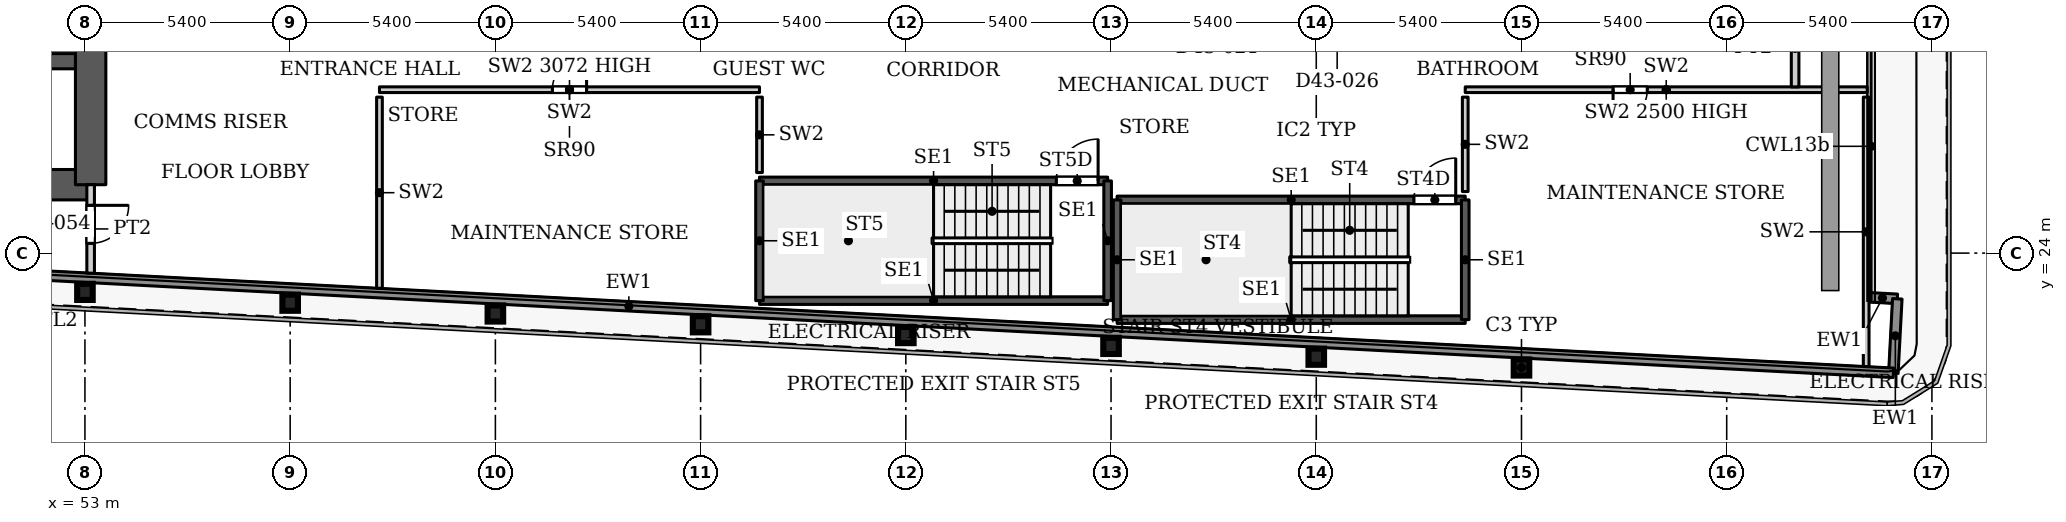
"""IFC4 building model, lengths in metres.
Left out: names, types, materials, properties, quantities, classifications, styles, units other than length and angle.
Written with IfcOpenShell. Run it as: python <this file> out.ifc"""

import sys

from ifc_helpers import new_model, si_unit, direction, frame, frame_2d, origin, origin_2d, place, context, subcontext, project, spatial, rectangle, i_section, extrude, source, transform, mapped, element, fill, save


model = new_model("IFC4")
c1 = context("Model", 3, precision=1e-05, world=origin(), true_north=direction((0.0, 1.0)))
c2 = subcontext(c1, "Body", "Model", "MODEL_VIEW")
j1 = project(units=[si_unit("LENGTHUNIT", "METRE"), si_unit("PLANEANGLEUNIT", "RADIAN")], contexts=[c1])
p1 = place(None, origin())
s1 = spatial("IfcSite", under=j1, at=p1, CompositionType="ELEMENT")
p2 = place(p1, origin())
s2 = spatial("IfcBuilding", under=s1, at=p2, CompositionType="ELEMENT")
p3 = place(p2, frame((0.0, 0.0, 187.7)))
s3 = spatial("IfcBuildingStorey", under=s2, at=p3, CompositionType="ELEMENT", Elevation=187.7)
for number, where, z_axis, x_axis in (
    (1, (90.8, 20.99, 0.0), (0.0, 0.0, 1.0), (1.0, 0.0, 0.0)),
    (2, (85.4, 21.274, 0.0), (0.0, 0.0, 1.0), (1.0, 0.0, 0.0)),
    (3, (80.0, 21.558, 0.0), (0.0, 0.0, 1.0), (1.0, 0.0, 0.0)),
    (4, (74.6, 21.843, 0.0), (0.0, 0.0, 1.0), (1.0, 0.0, 0.0)),
    (5, (69.2, 22.127, 0.0), (0.0, 0.0, 1.0), (1.0, 0.0, 0.0)),
    (6, (63.8, 22.411, 0.0), (0.0, 0.0, 1.0), (1.0, 0.0, 0.0)),
    (7, (58.4, 22.695, 0.0), (0.0, 0.0, 1.0), (1.0, 0.0, 0.0)),
    (8, (53.0, 22.98, 0.0), (0.0, 0.0, 1.0), (1.0, 0.0, 0.0)),
):
    element("IfcColumn", number, at=place(p3, frame(where, z_axis=z_axis, x_axis=x_axis)), inside=s3, PredefinedType="COLUMN", context=c2, shape_type="SweptSolid", body=[
        extrude(i_section(OverallWidth=0.409, OverallDepth=0.425, WebThickness=0.033, FlangeThickness=0.052, FilletRadius=0.013, at=origin_2d()), origin(), (0.0, 0.0, 1.0), 3.9),
    ])
p4 = place(p3, frame((34.75, 25.8, 0.0), z_axis=(0.0, 0.0, 1.0), x_axis=(1.0, 0.0, 0.0)))
e9 = element("IfcWall", 9, at=p4, inside=s3, PredefinedType="SHEAR", context=c2, shape_type="SweptSolid", body=[
    extrude(rectangle(XDim=18.4, YDim=0.8, at=frame_2d((9.2, 0.0))), origin(), (0.0, 0.0, 1.0), 3.9),
])
p5 = place(p3, frame((34.75, 29.05, 0.0), z_axis=(0.0, 0.0, 1.0), x_axis=(1.0, 0.0, 0.0)))
e10 = element("IfcWall", 10, at=p5, inside=s3, PredefinedType="SHEAR", context=c2, shape_type="SweptSolid", body=[
    extrude(rectangle(XDim=18.4, YDim=0.4, at=frame_2d((9.2, 0.0))), origin(), (0.0, 0.0, 1.0), 3.9),
])
p6 = place(p5, frame((0.875, 0.0, 0.0)))
e11 = element("IfcOpeningElement", 11, at=p6, cuts=e10, PredefinedType="OPENING", context=c2, shape_type="SweptSolid", body=[
    extrude(rectangle(XDim=1.1, YDim=2.2, at=frame_2d((0.55, 1.1))), frame((0.0, 0.21, 0.0), z_axis=(0.0, -1.0, 0.0), x_axis=(1.0, 0.0, 0.0)), (0.0, 0.0, 1.0), 0.42),
])
p7 = place(p5, frame((3.725, 0.0, 0.0)))
e12 = element("IfcOpeningElement", 12, at=p7, cuts=e10, PredefinedType="OPENING", context=c2, shape_type="SweptSolid", body=[
    extrude(rectangle(XDim=1.1, YDim=2.2, at=frame_2d((0.55, 1.1))), frame((0.0, 0.21, 0.0), z_axis=(0.0, -1.0, 0.0), x_axis=(1.0, 0.0, 0.0)), (0.0, 0.0, 1.0), 0.42),
])
p8 = place(p5, frame((6.575, 0.0, 0.0)))
e13 = element("IfcOpeningElement", 13, at=p8, cuts=e10, PredefinedType="OPENING", context=c2, shape_type="SweptSolid", body=[
    extrude(rectangle(XDim=1.1, YDim=2.2, at=frame_2d((0.55, 1.1))), frame((0.0, 0.21, 0.0), z_axis=(0.0, -1.0, 0.0), x_axis=(1.0, 0.0, 0.0)), (0.0, 0.0, 1.0), 0.42),
])
p9 = place(p5, frame((9.425, 0.0, 0.0)))
e14 = element("IfcOpeningElement", 14, at=p9, cuts=e10, PredefinedType="OPENING", context=c2, shape_type="SweptSolid", body=[
    extrude(rectangle(XDim=1.1, YDim=2.2, at=frame_2d((0.55, 1.1))), frame((0.0, 0.21, 0.0), z_axis=(0.0, -1.0, 0.0), x_axis=(1.0, 0.0, 0.0)), (0.0, 0.0, 1.0), 0.42),
])
p10 = place(p5, frame((12.275, 0.0, 0.0)))
e15 = element("IfcOpeningElement", 15, at=p10, cuts=e10, PredefinedType="OPENING", context=c2, shape_type="SweptSolid", body=[
    extrude(rectangle(XDim=1.1, YDim=2.2, at=frame_2d((0.55, 1.1))), frame((0.0, 0.21, 0.0), z_axis=(0.0, -1.0, 0.0), x_axis=(1.0, 0.0, 0.0)), (0.0, 0.0, 1.0), 0.42),
])
p11 = place(p5, frame((15.125, 0.0, 0.0)))
e16 = element("IfcOpeningElement", 16, at=p11, cuts=e10, PredefinedType="OPENING", context=c2, shape_type="SweptSolid", body=[
    extrude(rectangle(XDim=1.1, YDim=2.2, at=frame_2d((0.55, 1.1))), frame((0.0, 0.21, 0.0), z_axis=(0.0, -1.0, 0.0), x_axis=(1.0, 0.0, 0.0)), (0.0, 0.0, 1.0), 0.42),
])
p12 = place(p3, frame((53.15, 25.8, 0.0), z_axis=(0.0, 0.0, 1.0), x_axis=(0.0, 1.0, 0.0)))
e17 = element("IfcWall", 17, at=p12, inside=s3, PredefinedType="SHEAR", context=c2, shape_type="SweptSolid", body=[
    extrude(rectangle(XDim=10.4, YDim=0.8, at=frame_2d((5.2, 0.0))), origin(), (0.0, 0.0, 1.0), 3.9),
])
p13 = place(p3, frame((99.907, 22.839, 0.0), z_axis=(0.0, 0.0, 1.0), x_axis=(0.998561284263, -0.053622398031, 0.0)))
e18 = element("IfcWall", 18, at=p13, inside=s3, PredefinedType="SOLIDWALL", context=c2, shape_type="SweptSolid", body=[
    extrude(rectangle(XDim=0.783, YDim=0.25, at=frame_2d((0.392, 0.0))), origin(), (0.0, 0.0, 1.0), 3.75),
])
p14 = place(p3, frame((100.689, 22.797, 0.0), z_axis=(0.0, 0.0, 1.0), x_axis=(-0.052841433274, -0.998602915542, 0.0)))
e19 = element("IfcWall", 19, at=p14, inside=s3, PredefinedType="SOLIDWALL", context=c2, shape_type="SweptSolid", body=[
    extrude(rectangle(XDim=1.95, YDim=0.25, at=frame_2d((0.975, 0.0))), origin(), (0.0, 0.0, 1.0), 3.75),
])
p15 = place(p3, frame((100.586, 20.85, 0.0), z_axis=(0.0, 0.0, 1.0), x_axis=(-0.99861746497, 0.052565755559, 0.0)))
e20 = element("IfcWall", 20, at=p15, inside=s3, PredefinedType="SOLIDWALL", context=c2, shape_type="SweptSolid", body=[
    extrude(rectangle(XDim=66.639, YDim=0.25, at=frame_2d((33.319, 0.0))), origin(), (0.0, 0.0, 1.0), 3.75),
])
p16 = place(p3, frame((80.16, 22.25, 0.0), z_axis=(0.0, 0.0, 1.0), x_axis=(1.0, 0.0, 0.0)))
e21 = element("IfcWall", 21, at=p16, inside=s3, PredefinedType="SHEAR", context=c2, shape_type="SweptSolid", body=[
    extrude(rectangle(XDim=9.16, YDim=0.2, at=frame_2d((4.58, 0.0))), origin(), (0.0, 0.0, 1.0), 3.9),
])
p17 = place(p3, frame((80.16, 25.4, 0.0), z_axis=(0.0, 0.0, 1.0), x_axis=(1.0, 0.0, 0.0)))
e22 = element("IfcWall", 22, at=p17, inside=s3, PredefinedType="SHEAR", context=c2, shape_type="SweptSolid", body=[
    extrude(rectangle(XDim=9.16, YDim=0.2, at=frame_2d((4.58, 0.0))), origin(), (0.0, 0.0, 1.0), 3.9),
])
p18 = place(p17, frame((7.81, 0.0, 0.0)))
e23 = element("IfcOpeningElement", 23, at=p18, cuts=e22, PredefinedType="OPENING", context=c2, shape_type="SweptSolid", body=[
    extrude(rectangle(XDim=1.1, YDim=2.2, at=frame_2d((0.55, 1.1))), frame((0.0, 0.11, 0.0), z_axis=(0.0, -1.0, 0.0), x_axis=(1.0, 0.0, 0.0)), (0.0, 0.0, 1.0), 0.22),
])
for number, where, z_axis, x_axis in (
    (24, (80.16, 22.25, 0.0), (0.0, 0.0, 1.0), (0.0, 1.0, 0.0)),
    (25, (89.32, 22.25, 0.0), (0.0, 0.0, 1.0), (0.0, 1.0, 0.0)),
):
    element("IfcWall", number, at=place(p3, frame(where, z_axis=z_axis, x_axis=x_axis)), inside=s3, PredefinedType="SHEAR", context=c2, shape_type="SweptSolid", body=[
        extrude(rectangle(XDim=3.15, YDim=0.2, at=frame_2d((1.575, 0.0))), origin(), (0.0, 0.0, 1.0), 3.9),
    ])
p19 = place(p3, frame((70.75, 22.75, 0.0), z_axis=(0.0, 0.0, 1.0), x_axis=(1.0, 0.0, 0.0)))
e26 = element("IfcWall", 26, at=p19, inside=s3, PredefinedType="SHEAR", context=c2, shape_type="SweptSolid", body=[
    extrude(rectangle(XDim=9.16, YDim=0.2, at=frame_2d((4.58, 0.0))), origin(), (0.0, 0.0, 1.0), 3.9),
])
p20 = place(p3, frame((70.75, 25.9, 0.0), z_axis=(0.0, 0.0, 1.0), x_axis=(1.0, 0.0, 0.0)))
e27 = element("IfcWall", 27, at=p20, inside=s3, PredefinedType="SHEAR", context=c2, shape_type="SweptSolid", body=[
    extrude(rectangle(XDim=9.16, YDim=0.2, at=frame_2d((4.58, 0.0))), origin(), (0.0, 0.0, 1.0), 3.9),
])
p21 = place(p20, frame((7.81, 0.0, 0.0)))
e28 = element("IfcOpeningElement", 28, at=p21, cuts=e27, PredefinedType="OPENING", context=c2, shape_type="SweptSolid", body=[
    extrude(rectangle(XDim=1.1, YDim=2.2, at=frame_2d((0.55, 1.1))), frame((0.0, 0.11, 0.0), z_axis=(0.0, -1.0, 0.0), x_axis=(1.0, 0.0, 0.0)), (0.0, 0.0, 1.0), 0.22),
])
for number, where, z_axis, x_axis in (
    (29, (70.75, 22.75, 0.0), (0.0, 0.0, 1.0), (0.0, 1.0, 0.0)),
    (30, (79.91, 22.75, 0.0), (0.0, 0.0, 1.0), (0.0, 1.0, 0.0)),
):
    element("IfcWall", number, at=place(p3, frame(where, z_axis=z_axis, x_axis=x_axis)), inside=s3, PredefinedType="SHEAR", context=c2, shape_type="SweptSolid", body=[
        extrude(rectangle(XDim=3.15, YDim=0.2, at=frame_2d((1.575, 0.0))), origin(), (0.0, 0.0, 1.0), 3.9),
    ])
p22 = place(p3, frame((60.75, 28.3, 0.0), z_axis=(0.0, 0.0, 1.0), x_axis=(1.0, 0.0, 0.0)))
e31 = element("IfcWall", 31, at=p22, inside=s3, PredefinedType="PARTITIONING", context=c2, shape_type="SweptSolid", body=[
    extrude(rectangle(XDim=10.0, YDim=0.15, at=frame_2d((5.0, 0.0))), origin(), (0.0, 0.0, 1.0), 3.072),
])
p23 = place(p22, frame((4.55, 0.0, 0.0)))
e32 = element("IfcOpeningElement", 32, at=p23, cuts=e31, PredefinedType="OPENING", context=c2, shape_type="SweptSolid", body=[
    extrude(rectangle(XDim=0.9, YDim=2.2, at=frame_2d((0.45, 1.1))), frame((0.0, 0.085, 0.0), z_axis=(0.0, -1.0, 0.0), x_axis=(1.0, 0.0, 0.0)), (0.0, 0.0, 1.0), 0.17),
])
p24 = place(p3, frame((60.75, 23.075, 0.0), z_axis=(0.0, 0.0, 1.0), x_axis=(0.0, 1.0, 0.0)))
e33 = element("IfcWall", 33, at=p24, inside=s3, PredefinedType="PARTITIONING", context=c2, shape_type="SweptSolid", body=[
    extrude(rectangle(XDim=5.03, YDim=0.15, at=frame_2d((2.515, 0.0))), origin(), (0.0, 0.0, 1.0), 3.9),
])
p25 = place(p3, frame((70.75, 26.12, 0.0), z_axis=(0.0, 0.0, 1.0), x_axis=(0.0, 1.0, 0.0)))
e34 = element("IfcWall", 34, at=p25, inside=s3, PredefinedType="PARTITIONING", context=c2, shape_type="SweptSolid", body=[
    extrude(rectangle(XDim=1.985, YDim=0.15, at=frame_2d((0.992, 0.0))), origin(), (0.0, 0.0, 1.0), 3.9),
])
p26 = place(p3, frame((89.32, 28.3, 0.0), z_axis=(0.0, 0.0, 1.0), x_axis=(1.0, 0.0, 0.0)))
e35 = element("IfcWall", 35, at=p26, inside=s3, PredefinedType="PARTITIONING", context=c2, shape_type="SweptSolid", body=[
    extrude(rectangle(XDim=10.578, YDim=0.15, at=frame_2d((5.289, 0.0))), origin(), (0.0, 0.0, 1.0), 2.5),
])
p27 = place(p26, frame((3.89, 0.0, 0.0)))
e36 = element("IfcOpeningElement", 36, at=p27, cuts=e35, PredefinedType="OPENING", context=c2, shape_type="SweptSolid", body=[
    extrude(rectangle(XDim=0.9, YDim=2.2, at=frame_2d((0.45, 1.1))), frame((0.0, 0.085, 0.0), z_axis=(0.0, -1.0, 0.0), x_axis=(1.0, 0.0, 0.0)), (0.0, 0.0, 1.0), 0.17),
])
p28 = place(p3, frame((89.32, 25.62, 0.0), z_axis=(0.0, 0.0, 1.0), x_axis=(0.0, 1.0, 0.0)))
e37 = element("IfcWall", 37, at=p28, inside=s3, PredefinedType="PARTITIONING", context=c2, shape_type="SweptSolid", body=[
    extrude(rectangle(XDim=2.485, YDim=0.15, at=frame_2d((1.242, 0.0))), origin(), (0.0, 0.0, 1.0), 3.9),
])
p29 = place(p3, frame((99.87, 21.015, 0.0), z_axis=(0.0, 0.0, 1.0), x_axis=(0.0, 1.0, 0.0)))
e38 = element("IfcWall", 38, at=p29, inside=s3, PredefinedType="PARTITIONING", context=c2, shape_type="SweptSolid", body=[
    extrude(rectangle(XDim=7.09, YDim=0.15, at=frame_2d((3.545, 0.0))), origin(), (0.0, 0.0, 1.0), 3.9),
])
p30 = place(p3, frame((53.15, 23.472, 0.0), z_axis=(0.0, 0.0, 1.0), x_axis=(0.0, 1.0, 0.0)))
e39 = element("IfcWall", 39, at=p30, inside=s3, PredefinedType="PARTITIONING", context=c2, shape_type="SweptSolid", body=[
    extrude(rectangle(XDim=2.328, YDim=0.2, at=frame_2d((1.164, 0.0))), origin(), (0.0, 0.0, 1.0), 3.6),
])
p31 = place(p30, frame((0.785, 0.0, 0.0)))
e40 = element("IfcOpeningElement", 40, at=p31, cuts=e39, PredefinedType="OPENING", context=c2, shape_type="SweptSolid", body=[
    extrude(rectangle(XDim=1.0, YDim=2.1, at=frame_2d((0.5, 1.05))), frame((0.0, 0.11, 0.0), z_axis=(0.0, -1.0, 0.0), x_axis=(1.0, 0.0, 0.0)), (0.0, 0.0, 1.0), 0.22),
])
p32 = place(p3, frame((98.0, 28.374, 0.0), z_axis=(0.0, 0.0, 1.0), x_axis=(0.0, 1.0, 0.0)))
e41 = element("IfcWall", 41, at=p32, inside=s3, PredefinedType="PARTITIONING", context=c2, shape_type="SweptSolid", body=[
    extrude(rectangle(XDim=2.026, YDim=0.2, at=frame_2d((1.013, 0.0))), origin(), (0.0, 0.0, 1.0), 3.6),
])
m1 = source(origin(), c2, "Body", "SweptSolid", [
    extrude(rectangle(XDim=0.9, YDim=2.2, at=frame_2d((0.45, 1.1))), frame((0.0, 0.025, 0.0), z_axis=(0.0, -1.0, 0.0), x_axis=(1.0, 0.0, 0.0)), (0.0, 0.0, 1.0), 0.05),
])
p33 = place(p23, origin())
e42 = element("IfcDoor", 42, at=p33, inside=s3, OperationType="SINGLE_SWING_LEFT", PredefinedType="DOOR", context=c2, shape_type="MappedRepresentation", body=[
    mapped(m1, transform((0.0, 0.0, 0.0), x_axis=(1.0, 0.0, 0.0), y_axis=(0.0, 1.0, 0.0), z_axis=(0.0, 0.0, 1.0), scale=1.0)),
])
fill(e32, e42)
p34 = place(p27, origin())
e43 = element("IfcDoor", 43, at=p34, inside=s3, OperationType="SINGLE_SWING_RIGHT", PredefinedType="DOOR", context=c2, shape_type="MappedRepresentation", body=[
    mapped(m1, transform((0.0, 0.0, 0.0), x_axis=(1.0, 0.0, 0.0), y_axis=(0.0, 1.0, 0.0), z_axis=(0.0, 0.0, 1.0), scale=1.0)),
])
fill(e36, e43)
m2 = source(origin(), c2, "Body", "SweptSolid", [
    extrude(rectangle(XDim=1.1, YDim=2.2, at=frame_2d((0.55, 1.1))), frame((0.0, 0.025, 0.0), z_axis=(0.0, -1.0, 0.0), x_axis=(1.0, 0.0, 0.0)), (0.0, 0.0, 1.0), 0.05),
])
p35 = place(p18, origin())
e44 = element("IfcDoor", 44, at=p35, inside=s3, OperationType="SINGLE_SWING_LEFT", PredefinedType="DOOR", context=c2, shape_type="MappedRepresentation", body=[
    mapped(m2, transform((0.0, 0.0, 0.0), x_axis=(1.0, 0.0, 0.0), y_axis=(0.0, 1.0, 0.0), z_axis=(0.0, 0.0, 1.0), scale=1.0)),
])
fill(e23, e44)
p36 = place(p21, origin())
e45 = element("IfcDoor", 45, at=p36, inside=s3, OperationType="SINGLE_SWING_LEFT", PredefinedType="DOOR", context=c2, shape_type="MappedRepresentation", body=[
    mapped(m2, transform((0.0, 0.0, 0.0), x_axis=(1.0, 0.0, 0.0), y_axis=(0.0, 1.0, 0.0), z_axis=(0.0, 0.0, 1.0), scale=1.0)),
])
fill(e28, e45)
m3 = source(origin(), c2, "Body", "SweptSolid", [
    extrude(rectangle(XDim=1.0, YDim=2.1, at=frame_2d((0.5, 1.05))), frame((0.0, 0.025, 0.0), z_axis=(0.0, -1.0, 0.0), x_axis=(1.0, 0.0, 0.0)), (0.0, 0.0, 1.0), 0.05),
])
p37 = place(p31, origin())
e46 = element("IfcDoor", 46, at=p37, inside=s3, OperationType="SINGLE_SWING_RIGHT", PredefinedType="DOOR", context=c2, shape_type="MappedRepresentation", body=[
    mapped(m3, transform((0.0, 0.0, 0.0), x_axis=(1.0, 0.0, 0.0), y_axis=(0.0, 1.0, 0.0), z_axis=(0.0, 0.0, 1.0), scale=1.0)),
])
fill(e40, e46)
save(model, sys.argv[1])
